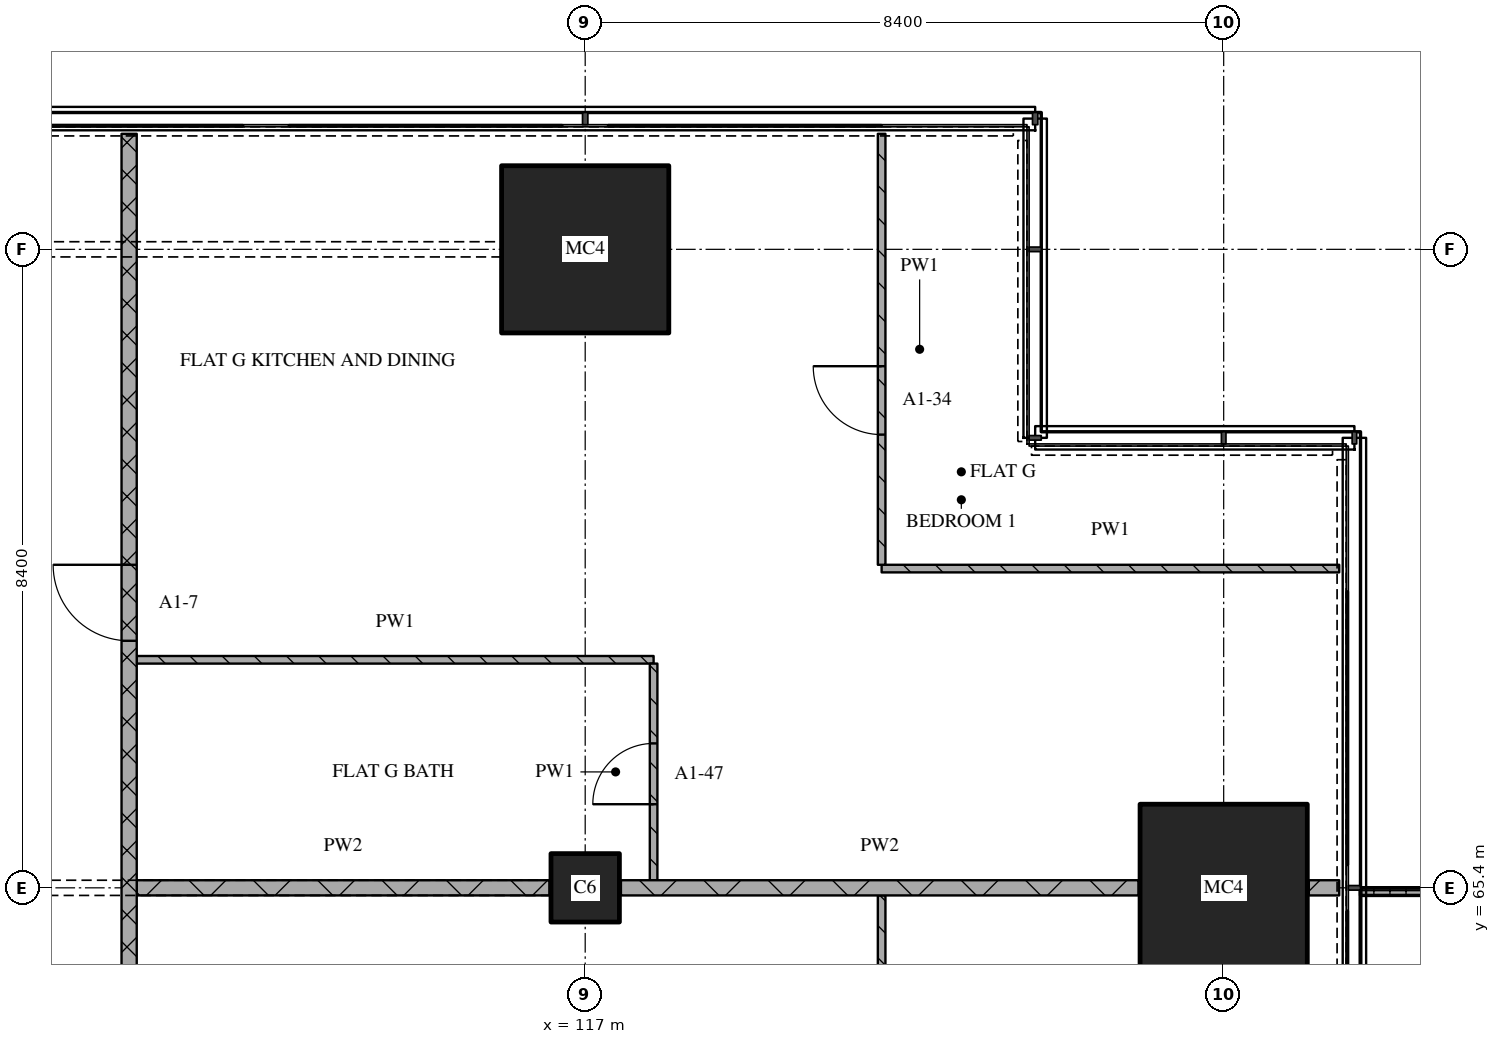
"""IFC4 building model, lengths in metres.
Left out: names, types, materials, properties, quantities, classifications, styles, units other than length and angle.
Written with IfcOpenShell. Run it as: python <this file> out.ifc"""

import sys

from ifc_helpers import new_model, si_unit, direction, frame, frame_2d, origin, origin_2d, place, context, subcontext, project, spatial, polyline, rectangle, outline, extrude, element, fill, save


model = new_model("IFC4")
c1 = context("Model", 3, precision=1e-05, world=origin(), true_north=direction((0.0, 1.0)))
c2 = subcontext(c1, "Body", "Model", "MODEL_VIEW")
j1 = project(units=[si_unit("LENGTHUNIT", "METRE"), si_unit("PLANEANGLEUNIT", "RADIAN")], contexts=[c1])
p1 = place(None, origin())
s1 = spatial("IfcSite", under=j1, at=p1, CompositionType="ELEMENT")
p2 = place(p1, origin())
s2 = spatial("IfcBuilding", under=s1, at=p2, CompositionType="ELEMENT")
p3 = place(p2, frame((0.0, 0.0, 37.2)))
s3 = spatial("IfcBuildingStorey", under=s2, at=p3, CompositionType="ELEMENT", Elevation=37.2)
p4 = place(p3, frame((117.0, 65.4, 0.0), z_axis=(0.0, 0.0, 1.0), x_axis=(1.0, 0.0, 0.0)))
e1 = element("IfcColumn", 1, at=p4, inside=s3, PredefinedType="COLUMN", context=c2, shape_type="SweptSolid", body=[
    extrude(rectangle(XDim=0.9, YDim=0.9, at=origin_2d()), origin(), (0.0, 0.0, 1.0), 3.6),
])
for number, where, z_axis, x_axis in (
    (2, (117.0, 73.8, 0.0), (0.0, 0.0, 1.0), (1.0, 0.0, 0.0)),
    (3, (125.4, 65.4, 0.0), (0.0, 0.0, 1.0), (1.0, 0.0, 0.0)),
):
    element("IfcColumn", number, at=place(p3, frame(where, z_axis=z_axis, x_axis=x_axis)), inside=s3, PredefinedType="COLUMN", context=c2, shape_type="SweptSolid", body=[
        extrude(rectangle(XDim=2.2, YDim=2.2, at=origin_2d()), origin(), (0.0, 0.0, 1.0), 3.6),
    ])
p5 = place(p3, origin())
e4 = element("IfcWall", 4, at=p5, inside=s3, PredefinedType="SOLIDWALL", context=c2, shape_type="SweptSolid", body=[
    extrude(outline(polyline([(127.2, 61.2), (127.2, 61.3), (128.833, 61.3), (128.833, 65.3), (127.2, 65.3), (127.2, 65.4), (128.933, 65.4), (128.933, 61.2), (127.2, 61.2)])), origin(), (0.0, 0.0, 1.0), 1.0),
])
p6 = place(p3, frame((111.1, 65.4, 0.0), z_axis=(0.0, 0.0, 1.0), x_axis=(1.0, 0.0, 0.0)))
e5 = element("IfcWall", 5, at=p6, inside=s3, PredefinedType="PARTITIONING", context=c2, shape_type="SweptSolid", body=[
    extrude(rectangle(XDim=5.43, YDim=0.2, at=frame_2d((2.715, 0.0))), origin(), (0.0, 0.0, 1.0), 2.82),
])
p7 = place(p3, frame((117.47, 65.4, 0.0), z_axis=(0.0, 0.0, 1.0), x_axis=(1.0, 0.0, 0.0)))
e6 = element("IfcWall", 6, at=p7, inside=s3, PredefinedType="PARTITIONING", context=c2, shape_type="SweptSolid", body=[
    extrude(rectangle(XDim=6.81, YDim=0.2, at=frame_2d((3.405, 0.0))), origin(), (0.0, 0.0, 1.0), 3.32),
])
p8 = place(p3, frame((126.52, 65.4, 0.0), z_axis=(0.0, 0.0, 1.0), x_axis=(1.0, 0.0, 0.0)))
e7 = element("IfcWall", 7, at=p8, inside=s3, PredefinedType="PARTITIONING", context=c2, shape_type="SweptSolid", body=[
    extrude(rectangle(XDim=0.4, YDim=0.2, at=frame_2d((0.2, 0.0))), origin(), (0.0, 0.0, 1.0), 3.32),
])
p9 = place(p3, frame((111.1, 68.4, 0.0), z_axis=(0.0, 0.0, 1.0), x_axis=(1.0, 0.0, 0.0)))
e8 = element("IfcWall", 8, at=p9, inside=s3, PredefinedType="PARTITIONING", context=c2, shape_type="SweptSolid", body=[
    extrude(rectangle(XDim=6.8, YDim=0.1, at=frame_2d((3.4, 0.0))), origin(), (0.0, 0.0, 1.0), 3.32),
])
p10 = place(p3, frame((120.9, 69.6, 0.0), z_axis=(0.0, 0.0, 1.0), x_axis=(1.0, 0.0, 0.0)))
e9 = element("IfcWall", 9, at=p10, inside=s3, PredefinedType="PARTITIONING", context=c2, shape_type="SweptSolid", body=[
    extrude(rectangle(XDim=6.02, YDim=0.1, at=frame_2d((3.01, 0.0))), origin(), (0.0, 0.0, 1.0), 3.32),
])
p11 = place(p3, frame((111.0, 75.32, 0.0), z_axis=(0.0, 0.0, 1.0), x_axis=(0.0, -1.0, 0.0)))
e10 = element("IfcWall", 10, at=p11, inside=s3, PredefinedType="PARTITIONING", context=c2, shape_type="SweptSolid", body=[
    extrude(rectangle(XDim=32.02, YDim=0.2, at=frame_2d((16.01, 0.0))), origin(), (0.0, 0.0, 1.0), 3.32),
])
p12 = place(p11, frame((5.67, 0.0, 0.0)))
e11 = element("IfcOpeningElement", 11, at=p12, cuts=e10, PredefinedType="OPENING", context=c2, shape_type="SweptSolid", body=[
    extrude(rectangle(XDim=1.0, YDim=2.1, at=frame_2d((0.5, 1.05))), frame((0.0, 0.11, 0.0), z_axis=(0.0, -1.0, 0.0), x_axis=(1.0, 0.0, 0.0)), (0.0, 0.0, 1.0), 0.22),
])
p13 = place(p3, frame((117.9, 65.5, 0.0), z_axis=(0.0, 0.0, 1.0), x_axis=(0.0, 1.0, 0.0)))
e12 = element("IfcWall", 12, at=p13, inside=s3, PredefinedType="PARTITIONING", context=c2, shape_type="SweptSolid", body=[
    extrude(rectangle(XDim=2.85, YDim=0.1, at=frame_2d((1.425, 0.0))), origin(), (0.0, 0.0, 1.0), 3.32),
])
p14 = place(p13, frame((1.0, 0.0, 0.0)))
e13 = element("IfcOpeningElement", 13, at=p14, cuts=e12, PredefinedType="OPENING", context=c2, shape_type="SweptSolid", body=[
    extrude(rectangle(XDim=0.8, YDim=2.1, at=frame_2d((0.4, 1.05))), frame((0.0, 0.06, 0.0), z_axis=(0.0, -1.0, 0.0), x_axis=(1.0, 0.0, 0.0)), (0.0, 0.0, 1.0), 0.12),
])
p15 = place(p3, frame((120.9, 55.491, 0.0), z_axis=(0.0, 0.0, 1.0), x_axis=(0.0, 1.0, 0.0)))
e14 = element("IfcWall", 14, at=p15, inside=s3, PredefinedType="PARTITIONING", context=c2, shape_type="SweptSolid", body=[
    extrude(rectangle(XDim=9.809, YDim=0.1, at=frame_2d((4.904, 0.0))), origin(), (0.0, 0.0, 1.0), 3.32),
])
p16 = place(p15, frame((4.479, 0.0, 0.0)))
e15 = element("IfcOpeningElement", 15, at=p16, cuts=e14, PredefinedType="OPENING", context=c2, shape_type="SweptSolid", body=[
    extrude(rectangle(XDim=0.9, YDim=2.1, at=frame_2d((0.45, 1.05))), frame((0.0, 0.06, 0.0), z_axis=(0.0, -1.0, 0.0), x_axis=(1.0, 0.0, 0.0)), (0.0, 0.0, 1.0), 0.12),
])
p17 = place(p3, frame((120.9, 75.32, 0.0), z_axis=(0.0, 0.0, 1.0), x_axis=(0.0, -1.0, 0.0)))
e16 = element("IfcWall", 16, at=p17, inside=s3, PredefinedType="PARTITIONING", context=c2, shape_type="SweptSolid", body=[
    extrude(rectangle(XDim=5.67, YDim=0.1, at=frame_2d((2.835, 0.0))), origin(), (0.0, 0.0, 1.0), 3.32),
])
p18 = place(p17, frame((3.058, 0.0, 0.0)))
e17 = element("IfcOpeningElement", 17, at=p18, cuts=e16, PredefinedType="OPENING", context=c2, shape_type="SweptSolid", body=[
    extrude(rectangle(XDim=0.9, YDim=2.1, at=frame_2d((0.45, 1.05))), frame((0.0, 0.06, 0.0), z_axis=(0.0, -1.0, 0.0), x_axis=(1.0, 0.0, 0.0)), (0.0, 0.0, 1.0), 0.12),
])
p19 = place(p12, origin())
e18 = element("IfcDoor", 18, at=p19, inside=s3, OperationType="SINGLE_SWING_RIGHT", PredefinedType="DOOR", context=c2, shape_type="SweptSolid", body=[
    extrude(rectangle(XDim=1.0, YDim=2.1, at=frame_2d((0.5, 1.05))), frame((0.0, 0.025, 0.0), z_axis=(0.0, -1.0, 0.0), x_axis=(1.0, 0.0, 0.0)), (0.0, 0.0, 1.0), 0.05),
])
fill(e11, e18)
p20 = place(p14, origin())
e19 = element("IfcDoor", 19, at=p20, inside=s3, OperationType="SINGLE_SWING_LEFT", PredefinedType="DOOR", context=c2, shape_type="SweptSolid", body=[
    extrude(rectangle(XDim=0.8, YDim=2.1, at=frame_2d((0.4, 1.05))), frame((0.0, 0.025, 0.0), z_axis=(0.0, -1.0, 0.0), x_axis=(1.0, 0.0, 0.0)), (0.0, 0.0, 1.0), 0.05),
])
fill(e13, e19)
p21 = place(p18, origin())
e20 = element("IfcDoor", 20, at=p21, inside=s3, OperationType="SINGLE_SWING_RIGHT", PredefinedType="DOOR", context=c2, shape_type="SweptSolid", body=[
    extrude(rectangle(XDim=0.9, YDim=2.1, at=frame_2d((0.45, 1.05))), frame((0.0, 0.025, 0.0), z_axis=(0.0, -1.0, 0.0), x_axis=(1.0, 0.0, 0.0)), (0.0, 0.0, 1.0), 0.05),
])
fill(e17, e20)
save(model, sys.argv[1])
